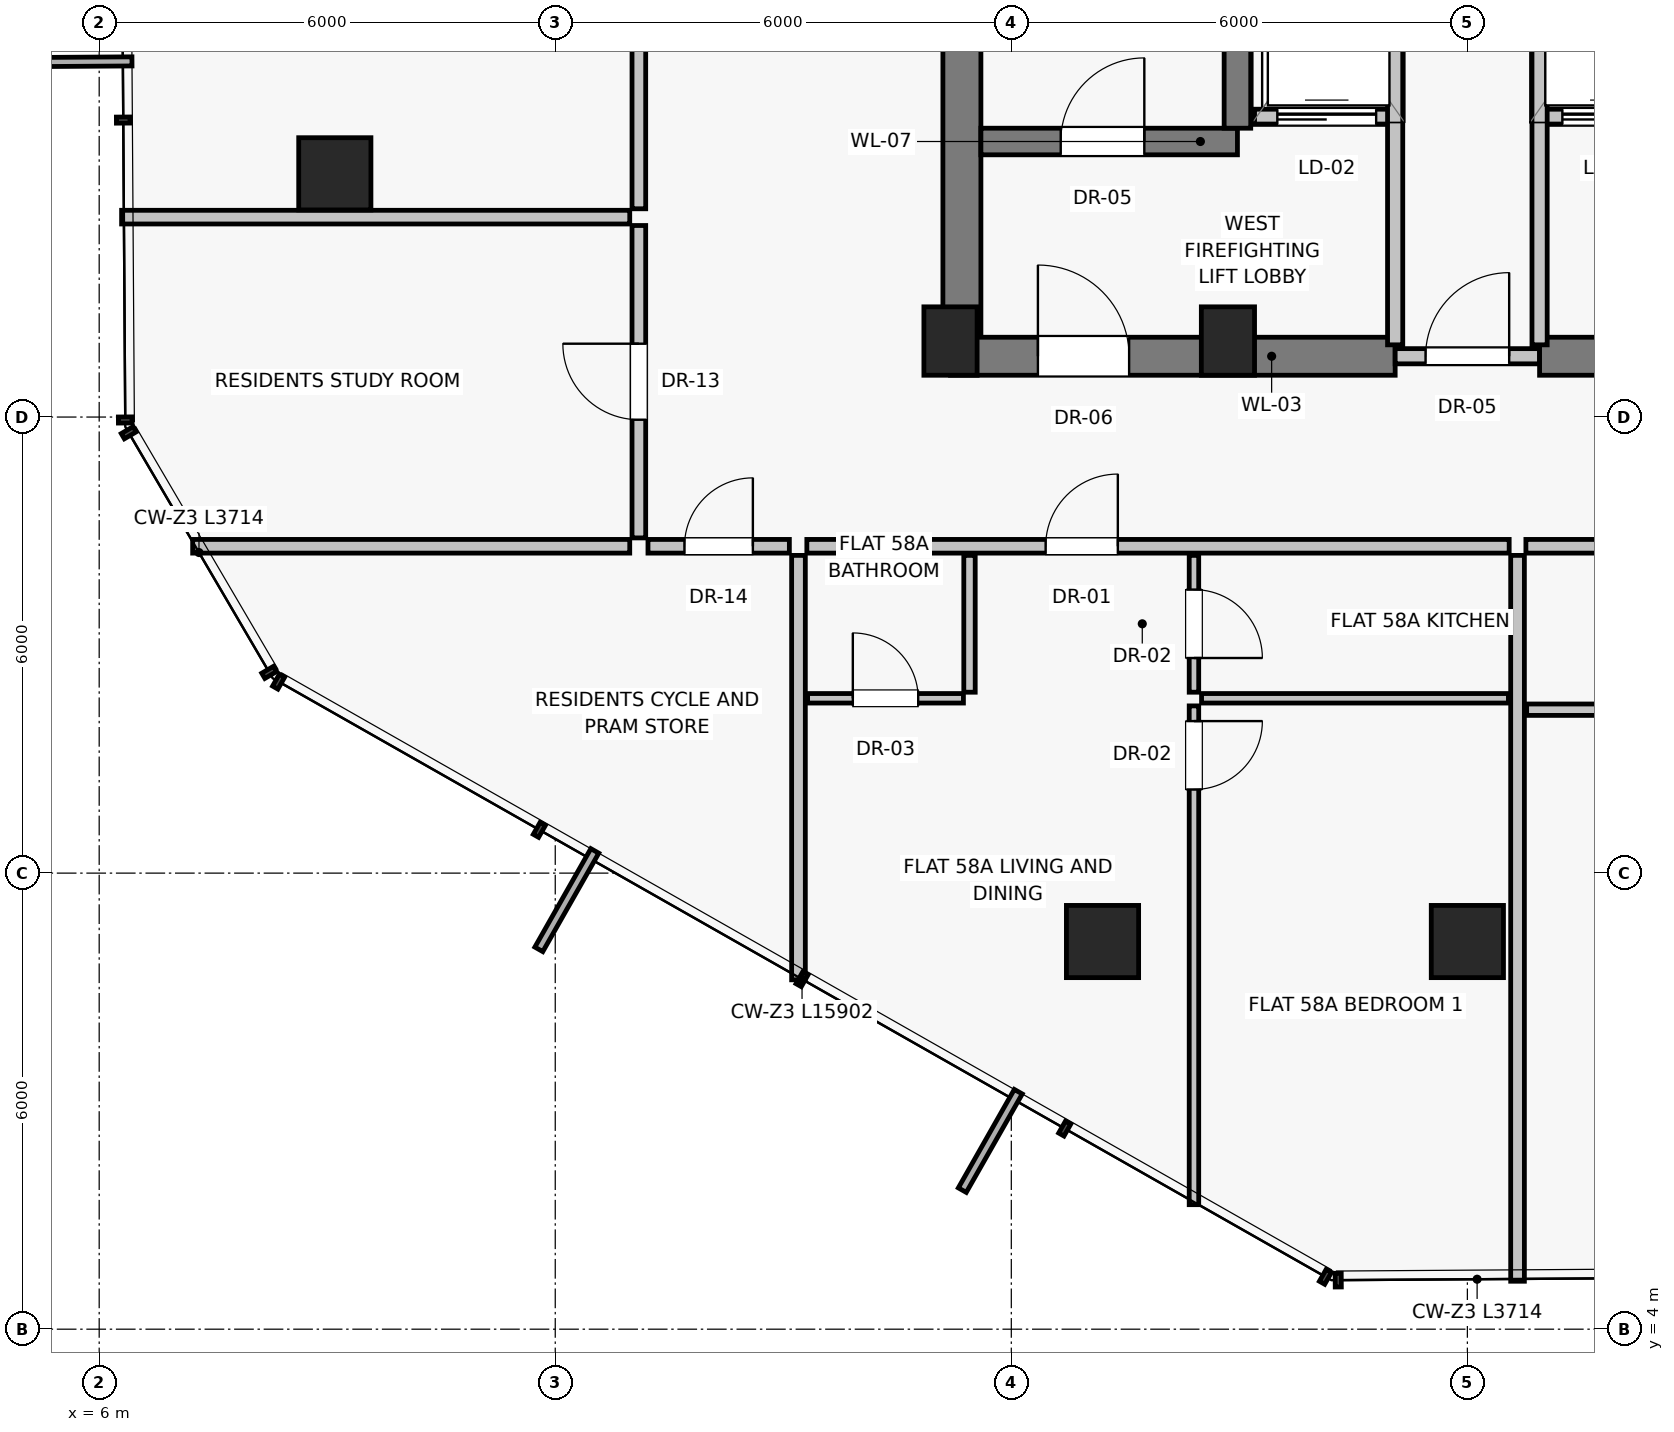
"""IFC4 building model, lengths in metres.
Left out: names, types, materials, properties, quantities, classifications, styles, units other than length and angle.
Written with IfcOpenShell. Run it as: python <this file> out.ifc"""

import sys

from ifc_helpers import new_model, si_unit, direction, frame, frame_2d, origin, origin_2d, place, context, subcontext, project, spatial, rectangle, extrude, source, transform, mapped, element, fill, save


model = new_model("IFC4")
c1 = context("Model", 3, precision=1e-05, world=origin(), true_north=direction((0.0, 1.0)))
c2 = subcontext(c1, "Body", "Model", "MODEL_VIEW")
j1 = project(units=[si_unit("LENGTHUNIT", "METRE"), si_unit("PLANEANGLEUNIT", "RADIAN")], contexts=[c1])
p1 = place(None, origin())
s1 = spatial("IfcSite", under=j1, at=p1, CompositionType="ELEMENT")
p2 = place(p1, origin())
s2 = spatial("IfcBuilding", under=s1, at=p2, CompositionType="ELEMENT")
p3 = place(p2, frame((0.0, 0.0, 204.85)))
s3 = spatial("IfcBuildingStorey", under=s2, at=p3, CompositionType="ELEMENT", Elevation=204.85)
for number, where, z_axis, x_axis in (
    (1, (17.2, 17.0, 0.0), (0.0, 0.0, 1.0), (1.0, 0.0, 0.0)),
    (2, (20.85, 17.0, 0.0), (0.0, 0.0, 1.0), (1.0, 0.0, 0.0)),
):
    element("IfcColumn", number, at=place(p3, frame(where, z_axis=z_axis, x_axis=x_axis)), inside=s3, PredefinedType="PILASTER", context=c2, shape_type="SweptSolid", body=[
        extrude(rectangle(XDim=0.7, YDim=0.9, at=origin_2d()), origin(), (0.0, 0.0, 1.0), 3.25),
    ])
for number, where, z_axis, x_axis in (
    (3, (9.1, 19.2, 0.0), (0.0, 0.0, 1.0), (1.0, 0.0, 0.0)),
    (4, (19.2, 9.1, 0.0), (0.0, 0.0, 1.0), (1.0, 0.0, 0.0)),
    (5, (24.0, 9.1, 0.0), (0.0, 0.0, 1.0), (1.0, 0.0, 0.0)),
):
    element("IfcColumn", number, at=place(p3, frame(where, z_axis=z_axis, x_axis=x_axis)), inside=s3, PredefinedType="COLUMN", context=c2, shape_type="SweptSolid", body=[
        extrude(rectangle(XDim=0.95, YDim=0.95, at=origin_2d()), origin(), (0.0, 0.0, 1.0), 3.25),
    ])
p4 = place(p3, frame((17.35, 16.8, 0.0), z_axis=(0.0, 0.0, 1.0), x_axis=(0.0, 1.0, 0.0)))
e6 = element("IfcWall", 6, at=p4, inside=s3, PredefinedType="SHEAR", context=c2, shape_type="SweptSolid", body=[
    extrude(rectangle(XDim=14.2, YDim=0.5, at=frame_2d((7.1, 0.0))), origin(), (0.0, 0.0, 1.0), 3.015),
])
p5 = place(p3, frame((17.2, 16.8, 0.0), z_axis=(0.0, 0.0, 1.0), x_axis=(1.0, 0.0, 0.0)))
e7 = element("IfcWall", 7, at=p5, inside=s3, PredefinedType="SHEAR", context=c2, shape_type="SweptSolid", body=[
    extrude(rectangle(XDim=5.85, YDim=0.5, at=frame_2d((2.925, 0.0))), origin(), (0.0, 0.0, 1.0), 3.015),
])
p6 = place(p5, frame((1.15, 0.0, 0.0)))
e8 = element("IfcOpeningElement", 8, at=p6, cuts=e7, PredefinedType="OPENING", context=c2, shape_type="SweptSolid", body=[
    extrude(rectangle(XDim=1.2, YDim=2.03, at=frame_2d((0.6, 1.015))), frame((0.0, 0.26, 0.0), z_axis=(0.0, -1.0, 0.0), x_axis=(1.0, 0.0, 0.0)), (0.0, 0.0, 1.0), 0.52),
])
p7 = place(p3, frame((23.05, 16.8, 0.0), z_axis=(0.0, 0.0, 1.0), x_axis=(1.0, 0.0, 0.0)))
e9 = element("IfcWall", 9, at=p7, inside=s3, PredefinedType="SOLIDWALL", context=c2, shape_type="SweptSolid", body=[
    extrude(rectangle(XDim=1.9, YDim=0.2, at=frame_2d((0.95, 0.0))), origin(), (0.0, 0.0, 1.0), 2.165),
])
p8 = place(p7, frame((0.4, 0.0, 0.0)))
e10 = element("IfcOpeningElement", 10, at=p8, cuts=e9, PredefinedType="OPENING", context=c2, shape_type="SweptSolid", body=[
    extrude(rectangle(XDim=1.1, YDim=2.03, at=frame_2d((0.55, 1.015))), frame((0.0, 0.11, 0.0), z_axis=(0.0, -1.0, 0.0), x_axis=(1.0, 0.0, 0.0)), (0.0, 0.0, 1.0), 0.22),
])
p9 = place(p3, frame((24.95, 16.8, 0.0), z_axis=(0.0, 0.0, 1.0), x_axis=(1.0, 0.0, 0.0)))
e11 = element("IfcWall", 11, at=p9, inside=s3, PredefinedType="SHEAR", context=c2, shape_type="SweptSolid", body=[
    extrude(rectangle(XDim=5.85, YDim=0.5, at=frame_2d((2.925, 0.0))), origin(), (0.0, 0.0, 1.0), 3.015),
])
p10 = place(p9, frame((2.15, 0.0, 0.0)))
e12 = element("IfcOpeningElement", 12, at=p10, cuts=e11, PredefinedType="OPENING", context=c2, shape_type="SweptSolid", body=[
    extrude(rectangle(XDim=1.2, YDim=2.03, at=frame_2d((0.6, 1.015))), frame((0.0, 0.26, 0.0), z_axis=(0.0, -1.0, 0.0), x_axis=(1.0, 0.0, 0.0)), (0.0, 0.0, 1.0), 0.52),
])
p11 = place(p3, frame((17.6, 19.625, 0.0), z_axis=(0.0, 0.0, 1.0), x_axis=(1.0, 0.0, 0.0)))
e13 = element("IfcWall", 13, at=p11, inside=s3, PredefinedType="SHEAR", context=c2, shape_type="SweptSolid", body=[
    extrude(rectangle(XDim=3.375, YDim=0.35, at=frame_2d((1.688, 0.0))), origin(), (0.0, 0.0, 1.0), 3.015),
])
p12 = place(p11, frame((1.05, 0.0, 0.0)))
e14 = element("IfcOpeningElement", 14, at=p12, cuts=e13, PredefinedType="OPENING", context=c2, shape_type="SweptSolid", body=[
    extrude(rectangle(XDim=1.1, YDim=2.03, at=frame_2d((0.55, 1.015))), frame((0.0, 0.185, 0.0), z_axis=(0.0, -1.0, 0.0), x_axis=(1.0, 0.0, 0.0)), (0.0, 0.0, 1.0), 0.37),
])
p13 = place(p3, frame((21.2, 19.95, 0.0), z_axis=(0.0, 0.0, 1.0), x_axis=(1.0, 0.0, 0.0)))
e15 = element("IfcWall", 15, at=p13, inside=s3, PredefinedType="SOLIDWALL", context=c2, shape_type="SweptSolid", body=[
    extrude(rectangle(XDim=1.85, YDim=0.2, at=frame_2d((0.925, 0.0))), origin(), (0.0, 0.0, 1.0), 3.015),
])
p14 = place(p13, frame((0.3, 0.0, 0.0)))
e16 = element("IfcOpeningElement", 16, at=p14, cuts=e15, PredefinedType="OPENING", context=c2, shape_type="SweptSolid", body=[
    extrude(rectangle(XDim=1.3, YDim=2.25, at=frame_2d((0.65, 1.125))), frame((0.0, 0.11, 0.0), z_axis=(0.0, -1.0, 0.0), x_axis=(1.0, 0.0, 0.0)), (0.0, 0.0, 1.0), 0.22),
])
p15 = place(p3, frame((24.95, 19.95, 0.0), z_axis=(0.0, 0.0, 1.0), x_axis=(1.0, 0.0, 0.0)))
e17 = element("IfcWall", 17, at=p15, inside=s3, PredefinedType="SOLIDWALL", context=c2, shape_type="SweptSolid", body=[
    extrude(rectangle(XDim=1.85, YDim=0.2, at=frame_2d((0.925, 0.0))), origin(), (0.0, 0.0, 1.0), 3.015),
])
p16 = place(p15, frame((0.3, 0.0, 0.0)))
e18 = element("IfcOpeningElement", 18, at=p16, cuts=e17, PredefinedType="OPENING", context=c2, shape_type="SweptSolid", body=[
    extrude(rectangle(XDim=1.3, YDim=2.25, at=frame_2d((0.65, 1.125))), frame((0.0, 0.11, 0.0), z_axis=(0.0, -1.0, 0.0), x_axis=(1.0, 0.0, 0.0)), (0.0, 0.0, 1.0), 0.22),
])
p17 = place(p3, frame((20.975, 19.8, 0.0), z_axis=(0.0, 0.0, 1.0), x_axis=(0.0, 1.0, 0.0)))
e19 = element("IfcWall", 19, at=p17, inside=s3, PredefinedType="SHEAR", context=c2, shape_type="SweptSolid", body=[
    extrude(rectangle(XDim=8.775, YDim=0.35, at=frame_2d((4.387, 0.0))), origin(), (0.0, 0.0, 1.0), 3.015),
])
for number, where, z_axis, x_axis in (
    (20, (23.05, 16.95, 0.0), (0.0, 0.0, 1.0), (0.0, 1.0, 0.0)),
    (21, (24.95, 16.95, 0.0), (0.0, 0.0, 1.0), (0.0, 1.0, 0.0)),
):
    element("IfcWall", number, at=place(p3, frame(where, z_axis=z_axis, x_axis=x_axis)), inside=s3, PredefinedType="SOLIDWALL", context=c2, shape_type="SweptSolid", body=[
        extrude(rectangle(XDim=5.6, YDim=0.2, at=frame_2d((2.8, 0.0))), origin(), (0.0, 0.0, 1.0), 3.015),
    ])
p18 = place(p3, frame((15.2, 14.18, 0.0), z_axis=(0.0, 0.0, 1.0), x_axis=(0.0, -1.0, 0.0)))
e22 = element("IfcWall", 22, at=p18, inside=s3, PredefinedType="PARTITIONING", context=c2, shape_type="SweptSolid", body=[
    extrude(rectangle(XDim=5.584, YDim=0.18, at=frame_2d((2.792, 0.0))), origin(), (0.0, 0.0, 1.0), 3.015),
])
p19 = place(p3, frame((15.31, 14.3, 0.0), z_axis=(0.0, 0.0, 1.0), x_axis=(1.0, 0.0, 0.0)))
e23 = element("IfcWall", 23, at=p19, inside=s3, PredefinedType="PARTITIONING", context=c2, shape_type="SweptSolid", body=[
    extrude(rectangle(XDim=9.24, YDim=0.18, at=frame_2d((4.62, 0.0))), origin(), (0.0, 0.0, 1.0), 3.015),
])
p20 = place(p19, frame((3.142, 0.0, 0.0)))
e24 = element("IfcOpeningElement", 24, at=p20, cuts=e23, PredefinedType="OPENING", context=c2, shape_type="SweptSolid", body=[
    extrude(rectangle(XDim=0.95, YDim=2.02, at=frame_2d((0.475, 1.01))), frame((0.0, 0.1, 0.0), z_axis=(0.0, -1.0, 0.0), x_axis=(1.0, 0.0, 0.0)), (0.0, 0.0, 1.0), 0.2),
])
p21 = place(p3, frame((17.45, 14.18, 0.0), z_axis=(0.0, 0.0, 1.0), x_axis=(0.0, -1.0, 0.0)))
e25 = element("IfcWall", 25, at=p21, inside=s3, PredefinedType="PARTITIONING", context=c2, shape_type="SweptSolid", body=[
    extrude(rectangle(XDim=1.8, YDim=0.15, at=frame_2d((0.9, 0.0))), origin(), (0.0, 0.0, 1.0), 3.015),
])
p22 = place(p3, frame((15.32, 12.3, 0.0), z_axis=(0.0, 0.0, 1.0), x_axis=(1.0, 0.0, 0.0)))
e26 = element("IfcWall", 26, at=p22, inside=s3, PredefinedType="PARTITIONING", context=c2, shape_type="SweptSolid", body=[
    extrude(rectangle(XDim=2.05, YDim=0.125, at=frame_2d((1.025, 0.0))), origin(), (0.0, 0.0, 1.0), 3.015),
])
p23 = place(p22, frame((0.595, 0.0, 0.0)))
e27 = element("IfcOpeningElement", 27, at=p23, cuts=e26, PredefinedType="OPENING", context=c2, shape_type="SweptSolid", body=[
    extrude(rectangle(XDim=0.86, YDim=2.01, at=frame_2d((0.43, 1.005))), frame((0.0, 0.073, 0.0), z_axis=(0.0, -1.0, 0.0), x_axis=(1.0, 0.0, 0.0)), (0.0, 0.0, 1.0), 0.145),
])
p24 = place(p3, frame((20.403, 14.18, 0.0), z_axis=(0.0, 0.0, 1.0), x_axis=(0.0, -1.0, 0.0)))
e28 = element("IfcWall", 28, at=p24, inside=s3, PredefinedType="PARTITIONING", context=c2, shape_type="SweptSolid", body=[
    extrude(rectangle(XDim=1.8, YDim=0.125, at=frame_2d((0.9, 0.0))), origin(), (0.0, 0.0, 1.0), 2.469),
])
p25 = place(p24, frame((0.45, 0.0, 0.0)))
e29 = element("IfcOpeningElement", 29, at=p25, cuts=e28, PredefinedType="OPENING", context=c2, shape_type="SweptSolid", body=[
    extrude(rectangle(XDim=0.9, YDim=2.01, at=frame_2d((0.45, 1.005))), frame((0.0, 0.073, 0.0), z_axis=(0.0, -1.0, 0.0), x_axis=(1.0, 0.0, 0.0)), (0.0, 0.0, 1.0), 0.145),
])
p26 = place(p3, frame((20.503, 12.3, 0.0), z_axis=(0.0, 0.0, 1.0), x_axis=(1.0, 0.0, 0.0)))
e30 = element("IfcWall", 30, at=p26, inside=s3, PredefinedType="PARTITIONING", context=c2, shape_type="SweptSolid", body=[
    extrude(rectangle(XDim=4.037, YDim=0.125, at=frame_2d((2.019, 0.0))), origin(), (0.0, 0.0, 1.0), 3.015),
])
p27 = place(p3, frame((20.403, 12.2, 0.0), z_axis=(0.0, 0.0, 1.0), x_axis=(0.0, -1.0, 0.0)))
e31 = element("IfcWall", 31, at=p27, inside=s3, PredefinedType="PARTITIONING", context=c2, shape_type="SweptSolid", body=[
    extrude(rectangle(XDim=6.562, YDim=0.125, at=frame_2d((3.281, 0.0))), origin(), (0.0, 0.0, 1.0), 3.015),
])
p28 = place(p27, frame((0.2, 0.0, 0.0)))
e32 = element("IfcOpeningElement", 32, at=p28, cuts=e31, PredefinedType="OPENING", context=c2, shape_type="SweptSolid", body=[
    extrude(rectangle(XDim=0.9, YDim=2.01, at=frame_2d((0.45, 1.005))), frame((0.0, 0.073, 0.0), z_axis=(0.0, -1.0, 0.0), x_axis=(1.0, 0.0, 0.0)), (0.0, 0.0, 1.0), 0.145),
])
p29 = place(p3, frame((24.66, 14.18, 0.0), z_axis=(0.0, 0.0, 1.0), x_axis=(0.0, -1.0, 0.0)))
e33 = element("IfcWall", 33, at=p29, inside=s3, PredefinedType="PARTITIONING", context=c2, shape_type="SweptSolid", body=[
    extrude(rectangle(XDim=9.549, YDim=0.18, at=frame_2d((4.774, 0.0))), origin(), (0.0, 0.0, 1.0), 3.015),
])
p30 = place(p3, frame((24.77, 14.3, 0.0), z_axis=(0.0, 0.0, 1.0), x_axis=(1.0, 0.0, 0.0)))
e34 = element("IfcWall", 34, at=p30, inside=s3, PredefinedType="PARTITIONING", context=c2, shape_type="SweptSolid", body=[
    extrude(rectangle(XDim=6.32, YDim=0.18, at=frame_2d((3.16, 0.0))), origin(), (0.0, 0.0, 1.0), 3.015),
])
p31 = place(p30, frame((3.878, 0.0, 0.0)))
e35 = element("IfcOpeningElement", 35, at=p31, cuts=e34, PredefinedType="OPENING", context=c2, shape_type="SweptSolid", body=[
    extrude(rectangle(XDim=0.95, YDim=2.02, at=frame_2d((0.475, 1.01))), frame((0.0, 0.1, 0.0), z_axis=(0.0, -1.0, 0.0), x_axis=(1.0, 0.0, 0.0)), (0.0, 0.0, 1.0), 0.2),
])
p32 = place(p3, frame((24.78, 12.15, 0.0), z_axis=(0.0, 0.0, 1.0), x_axis=(1.0, 0.0, 0.0)))
e36 = element("IfcWall", 36, at=p32, inside=s3, PredefinedType="PARTITIONING", context=c2, shape_type="SweptSolid", body=[
    extrude(rectangle(XDim=2.15, YDim=0.15, at=frame_2d((1.075, 0.0))), origin(), (0.0, 0.0, 1.0), 3.015),
])
p33 = place(p3, frame((12.98, 14.3, 0.0), z_axis=(0.0, 0.0, 1.0), x_axis=(-1.0, 0.0, 0.0)))
e37 = element("IfcWall", 37, at=p33, inside=s3, PredefinedType="PARTITIONING", context=c2, shape_type="SweptSolid", body=[
    extrude(rectangle(XDim=5.75, YDim=0.18, at=frame_2d((2.875, 0.0))), origin(), (0.0, 0.0, 1.0), 3.015),
])
p34 = place(p3, frame((13.1, 14.41, 0.0), z_axis=(0.0, 0.0, 1.0), x_axis=(0.0, 1.0, 0.0)))
e38 = element("IfcWall", 38, at=p34, inside=s3, PredefinedType="PARTITIONING", context=c2, shape_type="SweptSolid", body=[
    extrude(rectangle(XDim=4.11, YDim=0.18, at=frame_2d((2.055, 0.0))), origin(), (0.0, 0.0, 1.0), 2.662),
])
p35 = place(p34, frame((1.555, 0.0, 0.0)))
e39 = element("IfcOpeningElement", 39, at=p35, cuts=e38, PredefinedType="OPENING", context=c2, shape_type="SweptSolid", body=[
    extrude(rectangle(XDim=1.0, YDim=2.01, at=frame_2d((0.5, 1.005))), frame((0.0, 0.1, 0.0), z_axis=(0.0, -1.0, 0.0), x_axis=(1.0, 0.0, 0.0)), (0.0, 0.0, 1.0), 0.2),
])
p36 = place(p3, frame((13.1, 18.74, 0.0), z_axis=(0.0, 0.0, 1.0), x_axis=(0.0, 1.0, 0.0)))
e40 = element("IfcWall", 40, at=p36, inside=s3, PredefinedType="PARTITIONING", context=c2, shape_type="SweptSolid", body=[
    extrude(rectangle(XDim=6.844, YDim=0.18, at=frame_2d((3.422, 0.0))), origin(), (0.0, 0.0, 1.0), 2.662),
])
p37 = place(p36, frame((2.922, 0.0, 0.0)))
e41 = element("IfcOpeningElement", 41, at=p37, cuts=e40, PredefinedType="OPENING", context=c2, shape_type="SweptSolid", body=[
    extrude(rectangle(XDim=1.0, YDim=2.01, at=frame_2d((0.5, 1.005))), frame((0.0, 0.1, 0.0), z_axis=(0.0, -1.0, 0.0), x_axis=(1.0, 0.0, 0.0)), (0.0, 0.0, 1.0), 0.2),
])
p38 = place(p3, frame((12.98, 18.63, 0.0), z_axis=(0.0, 0.0, 1.0), x_axis=(-1.0, 0.0, 0.0)))
e42 = element("IfcWall", 42, at=p38, inside=s3, PredefinedType="PARTITIONING", context=c2, shape_type="SweptSolid", body=[
    extrude(rectangle(XDim=6.685, YDim=0.18, at=frame_2d((3.343, 0.0))), origin(), (0.0, 0.0, 1.0), 2.469),
])
p39 = place(p3, frame((13.22, 14.3, 0.0), z_axis=(0.0, 0.0, 1.0), x_axis=(1.0, 0.0, 0.0)))
e43 = element("IfcWall", 43, at=p39, inside=s3, PredefinedType="PARTITIONING", context=c2, shape_type="SweptSolid", body=[
    extrude(rectangle(XDim=1.86, YDim=0.18, at=frame_2d((0.93, 0.0))), origin(), (0.0, 0.0, 1.0), 3.015),
])
p40 = place(p39, frame((0.48, 0.0, 0.0)))
e44 = element("IfcOpeningElement", 44, at=p40, cuts=e43, PredefinedType="OPENING", context=c2, shape_type="SweptSolid", body=[
    extrude(rectangle(XDim=0.9, YDim=2.01, at=frame_2d((0.45, 1.005))), frame((0.0, 0.1, 0.0), z_axis=(0.0, -1.0, 0.0), x_axis=(1.0, 0.0, 0.0)), (0.0, 0.0, 1.0), 0.2),
])
m1 = source(origin(), c2, "Body", "SweptSolid", [
    extrude(rectangle(XDim=1.2, YDim=2.03, at=frame_2d((0.6, 1.015))), frame((0.0, 0.025, 0.0), z_axis=(0.0, -1.0, 0.0), x_axis=(1.0, 0.0, 0.0)), (0.0, 0.0, 1.0), 0.05),
])
p41 = place(p6, origin())
e45 = element("IfcDoor", 45, at=p41, inside=s3, OperationType="SINGLE_SWING_LEFT", PredefinedType="DOOR", context=c2, shape_type="MappedRepresentation", body=[
    mapped(m1, transform((0.0, 0.0, 0.0), scale=1.0)),
])
fill(e8, e45)
m2 = source(origin(), c2, "Body", "SweptSolid", [
    extrude(rectangle(XDim=1.1, YDim=2.03, at=frame_2d((0.55, 1.015))), frame((0.0, 0.025, 0.0), z_axis=(0.0, -1.0, 0.0), x_axis=(1.0, 0.0, 0.0)), (0.0, 0.0, 1.0), 0.05),
])
p42 = place(p8, origin())
e46 = element("IfcDoor", 46, at=p42, inside=s3, OperationType="SINGLE_SWING_RIGHT", PredefinedType="DOOR", context=c2, shape_type="MappedRepresentation", body=[
    mapped(m2, transform((0.0, 0.0, 0.0), scale=1.0)),
])
fill(e10, e46)
p43 = place(p12, origin())
e47 = element("IfcDoor", 47, at=p43, inside=s3, OperationType="SINGLE_SWING_RIGHT", PredefinedType="DOOR", context=c2, shape_type="MappedRepresentation", body=[
    mapped(m2, transform((0.0, 0.0, 0.0), scale=1.0)),
])
fill(e14, e47)
m3 = source(origin(), c2, "Body", "SweptSolid", [
    extrude(rectangle(XDim=1.3, YDim=2.25, at=frame_2d((0.65, 1.125))), frame((0.0, 0.025, 0.0), z_axis=(0.0, -1.0, 0.0), x_axis=(1.0, 0.0, 0.0)), (0.0, 0.0, 1.0), 0.05),
])
p44 = place(p14, origin())
e48 = element("IfcDoor", 48, at=p44, inside=s3, OperationType="SLIDING_TO_LEFT", PredefinedType="DOOR", context=c2, shape_type="MappedRepresentation", body=[
    mapped(m3, transform((0.0, 0.0, 0.0), scale=1.0)),
])
fill(e16, e48)
p45 = place(p16, origin())
e49 = element("IfcDoor", 49, at=p45, inside=s3, OperationType="SLIDING_TO_LEFT", PredefinedType="DOOR", context=c2, shape_type="MappedRepresentation", body=[
    mapped(m3, transform((0.0, 0.0, 0.0), scale=1.0)),
])
fill(e18, e49)
m4 = source(origin(), c2, "Body", "SweptSolid", [
    extrude(rectangle(XDim=0.95, YDim=2.02, at=frame_2d((0.475, 1.01))), frame((0.0, 0.025, 0.0), z_axis=(0.0, -1.0, 0.0), x_axis=(1.0, 0.0, 0.0)), (0.0, 0.0, 1.0), 0.05),
])
p46 = place(p20, origin())
e50 = element("IfcDoor", 50, at=p46, inside=s3, OperationType="SINGLE_SWING_RIGHT", PredefinedType="DOOR", context=c2, shape_type="MappedRepresentation", body=[
    mapped(m4, transform((0.0, 0.0, 0.0), scale=1.0)),
])
fill(e24, e50)
m5 = source(origin(), c2, "Body", "SweptSolid", [
    extrude(rectangle(XDim=0.86, YDim=2.01, at=frame_2d((0.43, 1.005))), frame((0.0, 0.025, 0.0), z_axis=(0.0, -1.0, 0.0), x_axis=(1.0, 0.0, 0.0)), (0.0, 0.0, 1.0), 0.05),
])
p47 = place(p23, origin())
e51 = element("IfcDoor", 51, at=p47, inside=s3, OperationType="SINGLE_SWING_LEFT", PredefinedType="DOOR", context=c2, shape_type="MappedRepresentation", body=[
    mapped(m5, transform((0.0, 0.0, 0.0), scale=1.0)),
])
fill(e27, e51)
m6 = source(origin(), c2, "Body", "SweptSolid", [
    extrude(rectangle(XDim=0.9, YDim=2.01, at=frame_2d((0.45, 1.005))), frame((0.0, 0.025, 0.0), z_axis=(0.0, -1.0, 0.0), x_axis=(1.0, 0.0, 0.0)), (0.0, 0.0, 1.0), 0.05),
])
p48 = place(p25, origin())
e52 = element("IfcDoor", 52, at=p48, inside=s3, OperationType="SINGLE_SWING_RIGHT", PredefinedType="DOOR", context=c2, shape_type="MappedRepresentation", body=[
    mapped(m6, transform((0.0, 0.0, 0.0), scale=1.0)),
])
fill(e29, e52)
p49 = place(p28, origin())
e53 = element("IfcDoor", 53, at=p49, inside=s3, OperationType="SINGLE_SWING_LEFT", PredefinedType="DOOR", context=c2, shape_type="MappedRepresentation", body=[
    mapped(m6, transform((0.0, 0.0, 0.0), scale=1.0)),
])
fill(e32, e53)
m7 = source(origin(), c2, "Body", "SweptSolid", [
    extrude(rectangle(XDim=1.0, YDim=2.01, at=frame_2d((0.5, 1.005))), frame((0.0, 0.025, 0.0), z_axis=(0.0, -1.0, 0.0), x_axis=(1.0, 0.0, 0.0)), (0.0, 0.0, 1.0), 0.05),
])
p50 = place(p35, origin())
e54 = element("IfcDoor", 54, at=p50, inside=s3, OperationType="SINGLE_SWING_RIGHT", PredefinedType="DOOR", context=c2, shape_type="MappedRepresentation", body=[
    mapped(m7, transform((0.0, 0.0, 0.0), scale=1.0)),
])
fill(e39, e54)
p51 = place(p40, origin())
e55 = element("IfcDoor", 55, at=p51, inside=s3, OperationType="SINGLE_SWING_RIGHT", PredefinedType="DOOR", context=c2, shape_type="MappedRepresentation", body=[
    mapped(m6, transform((0.0, 0.0, 0.0), scale=1.0)),
])
fill(e44, e55)
save(model, sys.argv[1])
